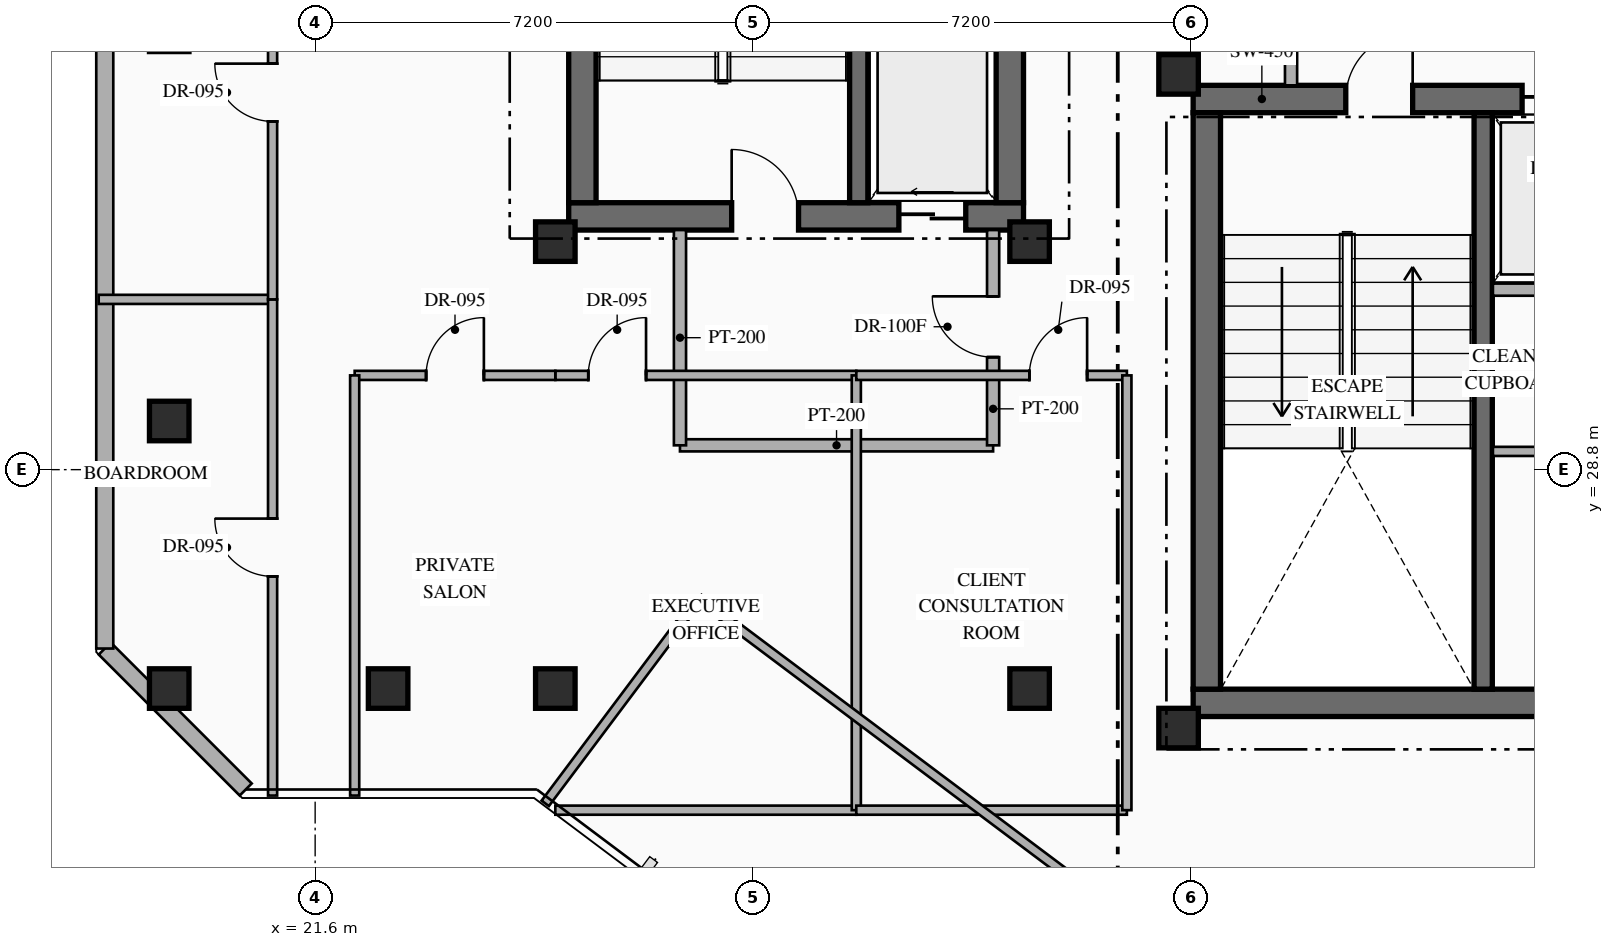
"""IFC4 building model, lengths in metres.
Left out: names, types, materials, properties, quantities, classifications, styles, units other than length and angle.
Written with IfcOpenShell. Run it as: python <this file> out.ifc"""

import sys

from ifc_helpers import new_model, si_unit, direction, frame, frame_2d, origin, origin_2d, place, context, subcontext, project, spatial, rectangle, hollow_rectangle, extrude, element, fill, save


model = new_model("IFC4")
c1 = context("Model", 3, precision=1e-05, world=origin(), true_north=direction((0.0, 1.0)))
c2 = subcontext(c1, "Body", "Model", "MODEL_VIEW")
j1 = project(units=[si_unit("LENGTHUNIT", "METRE"), si_unit("PLANEANGLEUNIT", "RADIAN")], contexts=[c1])
p1 = place(None, origin())
s1 = spatial("IfcSite", under=j1, at=p1, CompositionType="ELEMENT")
p2 = place(p1, origin())
s2 = spatial("IfcBuilding", under=s1, at=p2, CompositionType="ELEMENT")
p3 = place(p2, frame((0.0, 0.0, 253.95)))
s3 = spatial("IfcBuildingStorey", under=s2, at=p3, CompositionType="ELEMENT", Elevation=253.95)
p4 = place(p3, frame((25.77, 32.965, 0.0), z_axis=(0.0, 0.0, 1.0), x_axis=(1.0, 0.0, 0.0)))
e1 = element("IfcWall", 1, at=p4, inside=s3, PredefinedType="SHEAR", context=c2, shape_type="SweptSolid", body=[
    extrude(rectangle(XDim=7.48, YDim=0.45, at=frame_2d((3.74, 0.0))), origin(), (0.0, 0.0, 1.0), 3.6),
])
p5 = place(p4, frame((2.68, 0.0, 0.0)))
e2 = element("IfcOpeningElement", 2, at=p5, cuts=e1, PredefinedType="OPENING", context=c2, shape_type="SweptSolid", body=[
    extrude(rectangle(XDim=1.1, YDim=2.2, at=frame_2d((0.55, 1.1))), frame((0.0, 0.235, 0.0), z_axis=(0.0, -1.0, 0.0), x_axis=(1.0, 0.0, 0.0)), (0.0, 0.0, 1.0), 0.47),
])
p6 = place(p4, frame((5.43, 0.0, 0.0)))
e3 = element("IfcOpeningElement", 3, at=p6, cuts=e1, PredefinedType="OPENING", context=c2, shape_type="SweptSolid", body=[
    extrude(rectangle(XDim=1.1, YDim=2.15, at=frame_2d((0.55, 1.075))), frame((0.0, 0.235, 0.0), z_axis=(0.0, -1.0, 0.0), x_axis=(1.0, 0.0, 0.0)), (0.0, 0.0, 1.0), 0.47),
])
p7 = place(p3, frame((25.995, 33.19, 0.0), z_axis=(0.0, 0.0, 1.0), x_axis=(0.0, 1.0, 0.0)))
e4 = element("IfcWall", 4, at=p7, inside=s3, PredefinedType="SHEAR", context=c2, shape_type="SweptSolid", body=[
    extrude(rectangle(XDim=9.48, YDim=0.45, at=frame_2d((4.74, 0.0))), origin(), (0.0, 0.0, 1.0), 3.6),
])
p8 = place(p3, frame((33.025, 33.19, 0.0), z_axis=(0.0, 0.0, 1.0), x_axis=(0.0, 1.0, 0.0)))
e5 = element("IfcWall", 5, at=p8, inside=s3, PredefinedType="SHEAR", context=c2, shape_type="SweptSolid", body=[
    extrude(rectangle(XDim=9.48, YDim=0.45, at=frame_2d((4.74, 0.0))), origin(), (0.0, 0.0, 1.0), 3.6),
])
p9 = place(p8, frame((4.71, 0.0, 0.0)))
e6 = element("IfcOpeningElement", 6, at=p9, cuts=e5, PredefinedType="OPENING", context=c2, shape_type="SweptSolid", body=[
    extrude(rectangle(XDim=0.85, YDim=2.08, at=frame_2d((0.425, 1.04))), frame((0.0, 0.235, 0.0), z_axis=(0.0, -1.0, 0.0), x_axis=(1.0, 0.0, 0.0)), (0.0, 0.0, 1.0), 0.47),
])
p10 = place(p8, frame((7.76, 0.0, 0.0)))
e7 = element("IfcOpeningElement", 7, at=p10, cuts=e5, PredefinedType="OPENING", context=c2, shape_type="SweptSolid", body=[
    extrude(rectangle(XDim=0.85, YDim=2.08, at=frame_2d((0.425, 1.04))), frame((0.0, 0.235, 0.0), z_axis=(0.0, -1.0, 0.0), x_axis=(1.0, 0.0, 0.0)), (0.0, 0.0, 1.0), 0.47),
])
p11 = place(p3, frame((30.54, 33.19, 0.0), z_axis=(0.0, 0.0, 1.0), x_axis=(0.0, 1.0, 0.0)))
e8 = element("IfcWall", 8, at=p11, inside=s3, PredefinedType="SHEAR", context=c2, shape_type="SweptSolid", body=[
    extrude(rectangle(XDim=9.48, YDim=0.3, at=frame_2d((4.74, 0.0))), origin(), (0.0, 0.0, 1.0), 3.6),
])
p12 = place(p3, frame((36.04, 24.965, 0.0), z_axis=(0.0, 0.0, 1.0), x_axis=(1.0, 0.0, 0.0)))
e9 = element("IfcWall", 9, at=p12, inside=s3, PredefinedType="SHEAR", context=c2, shape_type="SweptSolid", body=[
    extrude(rectangle(XDim=7.46, YDim=0.45, at=frame_2d((3.73, 0.0))), origin(), (0.0, 0.0, 1.0), 3.6),
])
p13 = place(p3, frame((36.04, 34.895, 0.0), z_axis=(0.0, 0.0, 1.0), x_axis=(1.0, 0.0, 0.0)))
e10 = element("IfcWall", 10, at=p13, inside=s3, PredefinedType="SHEAR", context=c2, shape_type="SweptSolid", body=[
    extrude(rectangle(XDim=7.46, YDim=0.45, at=frame_2d((3.73, 0.0))), origin(), (0.0, 0.0, 1.0), 3.6),
])
p14 = place(p13, frame((2.51, 0.0, 0.0)))
e11 = element("IfcOpeningElement", 11, at=p14, cuts=e10, PredefinedType="OPENING", context=c2, shape_type="SweptSolid", body=[
    extrude(rectangle(XDim=1.1, YDim=2.2, at=frame_2d((0.55, 1.1))), frame((0.0, 0.235, 0.0), z_axis=(0.0, -1.0, 0.0), x_axis=(1.0, 0.0, 0.0)), (0.0, 0.0, 1.0), 0.47),
])
p15 = place(p13, frame((5.41, 0.0, 0.0)))
e12 = element("IfcOpeningElement", 12, at=p15, cuts=e10, PredefinedType="OPENING", context=c2, shape_type="SweptSolid", body=[
    extrude(rectangle(XDim=1.12, YDim=2.15, at=frame_2d((0.56, 1.075))), frame((0.0, 0.235, 0.0), z_axis=(0.0, -1.0, 0.0), x_axis=(1.0, 0.0, 0.0)), (0.0, 0.0, 1.0), 0.47),
])
p16 = place(p3, frame((36.265, 25.19, 0.0), z_axis=(0.0, 0.0, 1.0), x_axis=(0.0, 1.0, 0.0)))
e13 = element("IfcWall", 13, at=p16, inside=s3, PredefinedType="SHEAR", context=c2, shape_type="SweptSolid", body=[
    extrude(rectangle(XDim=9.48, YDim=0.45, at=frame_2d((4.74, 0.0))), origin(), (0.0, 0.0, 1.0), 3.6),
])
p17 = place(p3, frame((40.81, 25.19, 0.0), z_axis=(0.0, 0.0, 1.0), x_axis=(0.0, 1.0, 0.0)))
e14 = element("IfcWall", 14, at=p17, inside=s3, PredefinedType="SHEAR", context=c2, shape_type="SweptSolid", body=[
    extrude(rectangle(XDim=9.48, YDim=0.3, at=frame_2d((4.74, 0.0))), origin(), (0.0, 0.0, 1.0), 3.6),
])
for number, where, z_axis, x_axis in (
    (15, (25.55, 32.55, 0.0), (0.0, 0.0, 1.0), (1.0, 0.0, 0.0)),
    (16, (33.35, 32.55, 0.0), (0.0, 0.0, 1.0), (1.0, 0.0, 0.0)),
    (17, (35.8, 24.55, 0.0), (0.0, 0.0, 1.0), (1.0, 0.0, 0.0)),
    (18, (35.8, 35.3, 0.0), (0.0, 0.0, 1.0), (1.0, 0.0, 0.0)),
    (19, (25.55, 25.2, 0.0), (0.0, 0.0, 1.0), (1.0, 0.0, 0.0)),
    (20, (33.35, 25.2, 0.0), (0.0, 0.0, 1.0), (1.0, 0.0, 0.0)),
    (21, (19.2, 25.2, 0.0), (0.0, 0.0, 1.0), (1.0, 0.0, 0.0)),
    (22, (19.2, 29.6, 0.0), (0.0, 0.0, 1.0), (1.0, 0.0, 0.0)),
    (23, (22.8, 25.2, 0.0), (0.0, 0.0, 1.0), (1.0, 0.0, 0.0)),
):
    element("IfcColumn", number, at=place(p3, frame(where, z_axis=z_axis, x_axis=x_axis)), inside=s3, PredefinedType="COLUMN", context=c2, shape_type="SweptSolid", body=[
        extrude(hollow_rectangle(XDim=0.65, YDim=0.65, WallThickness=0.025, at=origin_2d()), origin(), (0.0, 0.0, 1.0), 3.6),
    ])
p18 = place(p3, frame((20.458, 23.54, 0.0), z_axis=(0.0, 0.0, 1.0), x_axis=(-0.707144017911, 0.707069542501, 0.0)))
e24 = element("IfcWall", 24, at=p18, inside=s3, PredefinedType="STANDARD", context=c2, shape_type="SweptSolid", body=[
    extrude(rectangle(XDim=3.278, YDim=0.28, at=frame_2d((1.639, 0.0))), origin(), (0.0, 0.0, 1.0), 3.35),
])
p19 = place(p3, frame((18.14, 25.858, 0.0), z_axis=(0.0, 0.0, 1.0), x_axis=(0.0, 1.0, 0.0)))
e25 = element("IfcWall", 25, at=p19, inside=s3, PredefinedType="STANDARD", context=c2, shape_type="SweptSolid", body=[
    extrude(rectangle(XDim=22.084, YDim=0.28, at=frame_2d((11.042, 0.0))), origin(), (0.0, 0.0, 1.0), 3.35),
])
p20 = place(p3, frame((40.97, 31.76, 0.0), z_axis=(0.0, 0.0, 1.0), x_axis=(1.0, 0.0, 0.0)))
e26 = element("IfcWall", 26, at=p20, inside=s3, PredefinedType="STANDARD", context=c2, shape_type="SweptSolid", body=[
    extrude(rectangle(XDim=2.08, YDim=0.2, at=frame_2d((1.04, 0.0))), origin(), (0.0, 0.0, 1.0), 3.35),
])
p21 = place(p3, frame((40.97, 29.1, 0.0), z_axis=(0.0, 0.0, 1.0), x_axis=(1.0, 0.0, 0.0)))
e27 = element("IfcWall", 27, at=p21, inside=s3, PredefinedType="PARTITIONING", context=c2, shape_type="SweptSolid", body=[
    extrude(rectangle(XDim=2.08, YDim=0.15, at=frame_2d((1.04, 0.0))), origin(), (0.0, 0.0, 1.0), 3.35),
])
p22 = place(p3, frame((27.6, 29.2, 0.0), z_axis=(0.0, 0.0, 1.0), x_axis=(1.0, 0.0, 0.0)))
e28 = element("IfcWall", 28, at=p22, inside=s3, PredefinedType="STANDARD", context=c2, shape_type="SweptSolid", body=[
    extrude(rectangle(XDim=5.15, YDim=0.2, at=frame_2d((2.575, 0.0))), origin(), (0.0, 0.0, 1.0), 3.35),
])
p23 = place(p3, frame((27.6, 29.2, 0.0), z_axis=(0.0, 0.0, 1.0), x_axis=(0.0, 1.0, 0.0)))
e29 = element("IfcWall", 29, at=p23, inside=s3, PredefinedType="STANDARD", context=c2, shape_type="SweptSolid", body=[
    extrude(rectangle(XDim=3.54, YDim=0.2, at=frame_2d((1.77, 0.0))), origin(), (0.0, 0.0, 1.0), 3.35),
])
p24 = place(p3, frame((32.75, 29.2, 0.0), z_axis=(0.0, 0.0, 1.0), x_axis=(0.0, 1.0, 0.0)))
e30 = element("IfcWall", 30, at=p24, inside=s3, PredefinedType="STANDARD", context=c2, shape_type="SweptSolid", body=[
    extrude(rectangle(XDim=3.54, YDim=0.2, at=frame_2d((1.77, 0.0))), origin(), (0.0, 0.0, 1.0), 3.35),
])
p25 = place(p24, frame((1.45, 0.0, 0.0)))
e31 = element("IfcOpeningElement", 31, at=p25, cuts=e30, PredefinedType="OPENING", context=c2, shape_type="SweptSolid", body=[
    extrude(rectangle(XDim=1.0, YDim=2.2, at=frame_2d((0.5, 1.1))), frame((0.0, 0.11, 0.0), z_axis=(0.0, -1.0, 0.0), x_axis=(1.0, 0.0, 0.0)), (0.0, 0.0, 1.0), 0.22),
])
p26 = place(p3, frame((37.65, 35.12, 0.0), z_axis=(0.0, 0.0, 1.0), x_axis=(0.0, 1.0, 0.0)))
e32 = element("IfcWall", 32, at=p26, inside=s3, PredefinedType="STANDARD", context=c2, shape_type="SweptSolid", body=[
    extrude(rectangle(XDim=2.98, YDim=0.2, at=frame_2d((1.49, 0.0))), origin(), (0.0, 0.0, 1.0), 3.35),
])
p27 = place(p26, frame((0.99, 0.0, 0.0)))
e33 = element("IfcOpeningElement", 33, at=p27, cuts=e32, PredefinedType="OPENING", context=c2, shape_type="SweptSolid", body=[
    extrude(rectangle(XDim=1.0, YDim=2.2, at=frame_2d((0.5, 1.1))), frame((0.0, 0.11, 0.0), z_axis=(0.0, -1.0, 0.0), x_axis=(1.0, 0.0, 0.0)), (0.0, 0.0, 1.0), 0.22),
])
p28 = place(p3, frame((25.55, 23.2, 0.0), z_axis=(0.0, 0.0, 1.0), x_axis=(1.0, 0.0, 0.0)))
e34 = element("IfcWall", 34, at=p28, inside=s3, PredefinedType="PARTITIONING", context=c2, shape_type="SweptSolid", body=[
    extrude(rectangle(XDim=4.95, YDim=0.15, at=frame_2d((2.475, 0.0))), origin(), (0.0, 0.0, 1.0), 3.35),
])
p29 = place(p3, frame((25.55, 30.35, 0.0), z_axis=(0.0, 0.0, 1.0), x_axis=(1.0, 0.0, 0.0)))
e35 = element("IfcWall", 35, at=p29, inside=s3, PredefinedType="PARTITIONING", context=c2, shape_type="SweptSolid", body=[
    extrude(rectangle(XDim=4.95, YDim=0.15, at=frame_2d((2.475, 0.0))), origin(), (0.0, 0.0, 1.0), 3.35),
])
p30 = place(p29, frame((0.542, 0.0, 0.0)))
e36 = element("IfcOpeningElement", 36, at=p30, cuts=e35, PredefinedType="OPENING", context=c2, shape_type="SweptSolid", body=[
    extrude(rectangle(XDim=0.95, YDim=2.15, at=frame_2d((0.475, 1.075))), frame((0.0, 0.085, 0.0), z_axis=(0.0, -1.0, 0.0), x_axis=(1.0, 0.0, 0.0)), (0.0, 0.0, 1.0), 0.17),
])
p31 = place(p3, frame((30.5, 23.2, 0.0), z_axis=(0.0, 0.0, 1.0), x_axis=(0.0, 1.0, 0.0)))
e37 = element("IfcWall", 37, at=p31, inside=s3, PredefinedType="PARTITIONING", context=c2, shape_type="SweptSolid", body=[
    extrude(rectangle(XDim=7.15, YDim=0.15, at=frame_2d((3.575, 0.0))), origin(), (0.0, 0.0, 1.0), 3.35),
])
p32 = place(p3, frame((30.5, 23.2, 0.0), z_axis=(0.0, 0.0, 1.0), x_axis=(1.0, 0.0, 0.0)))
e38 = element("IfcWall", 38, at=p32, inside=s3, PredefinedType="PARTITIONING", context=c2, shape_type="SweptSolid", body=[
    extrude(rectangle(XDim=4.45, YDim=0.15, at=frame_2d((2.225, 0.0))), origin(), (0.0, 0.0, 1.0), 3.35),
])
p33 = place(p3, frame((30.5, 30.35, 0.0), z_axis=(0.0, 0.0, 1.0), x_axis=(1.0, 0.0, 0.0)))
e39 = element("IfcWall", 39, at=p33, inside=s3, PredefinedType="PARTITIONING", context=c2, shape_type="SweptSolid", body=[
    extrude(rectangle(XDim=4.45, YDim=0.15, at=frame_2d((2.225, 0.0))), origin(), (0.0, 0.0, 1.0), 3.35),
])
p34 = place(p33, frame((2.846, 0.0, 0.0)))
e40 = element("IfcOpeningElement", 40, at=p34, cuts=e39, PredefinedType="OPENING", context=c2, shape_type="SweptSolid", body=[
    extrude(rectangle(XDim=0.95, YDim=2.15, at=frame_2d((0.475, 1.075))), frame((0.0, 0.085, 0.0), z_axis=(0.0, -1.0, 0.0), x_axis=(1.0, 0.0, 0.0)), (0.0, 0.0, 1.0), 0.17),
])
p35 = place(p3, frame((34.95, 23.2, 0.0), z_axis=(0.0, 0.0, 1.0), x_axis=(0.0, 1.0, 0.0)))
e41 = element("IfcWall", 41, at=p35, inside=s3, PredefinedType="PARTITIONING", context=c2, shape_type="SweptSolid", body=[
    extrude(rectangle(XDim=7.15, YDim=0.15, at=frame_2d((3.575, 0.0))), origin(), (0.0, 0.0, 1.0), 3.35),
])
p36 = place(p3, frame((18.04, 31.6, 0.0), z_axis=(0.0, 0.0, 1.0), x_axis=(1.0, 0.0, 0.0)))
e42 = element("IfcWall", 42, at=p36, inside=s3, PredefinedType="PARTITIONING", context=c2, shape_type="SweptSolid", body=[
    extrude(rectangle(XDim=2.86, YDim=0.15, at=frame_2d((1.43, 0.0))), origin(), (0.0, 0.0, 1.0), 3.35),
])
p37 = place(p3, frame((20.9, 23.44, 0.0), z_axis=(0.0, 0.0, 1.0), x_axis=(0.0, 1.0, 0.0)))
e43 = element("IfcWall", 43, at=p37, inside=s3, PredefinedType="PARTITIONING", context=c2, shape_type="SweptSolid", body=[
    extrude(rectangle(XDim=8.16, YDim=0.15, at=frame_2d((4.08, 0.0))), origin(), (0.0, 0.0, 1.0), 3.35),
])
p38 = place(p37, frame((3.605, 0.0, 0.0)))
e44 = element("IfcOpeningElement", 44, at=p38, cuts=e43, PredefinedType="OPENING", context=c2, shape_type="SweptSolid", body=[
    extrude(rectangle(XDim=0.95, YDim=2.15, at=frame_2d((0.475, 1.075))), frame((0.0, 0.085, 0.0), z_axis=(0.0, -1.0, 0.0), x_axis=(1.0, 0.0, 0.0)), (0.0, 0.0, 1.0), 0.17),
])
p39 = place(p3, frame((20.9, 31.6, 0.0), z_axis=(0.0, 0.0, 1.0), x_axis=(0.0, 1.0, 0.0)))
e45 = element("IfcWall", 45, at=p39, inside=s3, PredefinedType="PARTITIONING", context=c2, shape_type="SweptSolid", body=[
    extrude(rectangle(XDim=10.2, YDim=0.15, at=frame_2d((5.1, 0.0))), origin(), (0.0, 0.0, 1.0), 3.35),
])
p40 = place(p39, frame((2.927, 0.0, 0.0)))
e46 = element("IfcOpeningElement", 46, at=p40, cuts=e45, PredefinedType="OPENING", context=c2, shape_type="SweptSolid", body=[
    extrude(rectangle(XDim=0.95, YDim=2.15, at=frame_2d((0.475, 1.075))), frame((0.0, 0.085, 0.0), z_axis=(0.0, -1.0, 0.0), x_axis=(1.0, 0.0, 0.0)), (0.0, 0.0, 1.0), 0.17),
])
p41 = place(p3, frame((22.25, 30.35, 0.0), z_axis=(0.0, 0.0, 1.0), x_axis=(1.0, 0.0, 0.0)))
e47 = element("IfcWall", 47, at=p41, inside=s3, PredefinedType="PARTITIONING", context=c2, shape_type="SweptSolid", body=[
    extrude(rectangle(XDim=3.3, YDim=0.15, at=frame_2d((1.65, 0.0))), origin(), (0.0, 0.0, 1.0), 3.35),
])
p42 = place(p41, frame((1.175, 0.0, 0.0)))
e48 = element("IfcOpeningElement", 48, at=p42, cuts=e47, PredefinedType="OPENING", context=c2, shape_type="SweptSolid", body=[
    extrude(rectangle(XDim=0.95, YDim=2.15, at=frame_2d((0.475, 1.075))), frame((0.0, 0.085, 0.0), z_axis=(0.0, -1.0, 0.0), x_axis=(1.0, 0.0, 0.0)), (0.0, 0.0, 1.0), 0.17),
])
p43 = place(p3, frame((22.25, 23.44, 0.0), z_axis=(0.0, 0.0, 1.0), x_axis=(0.0, 1.0, 0.0)))
e49 = element("IfcWall", 49, at=p43, inside=s3, PredefinedType="PARTITIONING", context=c2, shape_type="SweptSolid", body=[
    extrude(rectangle(XDim=6.91, YDim=0.15, at=frame_2d((3.455, 0.0))), origin(), (0.0, 0.0, 1.0), 3.35),
])
p44 = place(p3, frame((27.91, 26.68, 0.0), z_axis=(0.0, 0.0, 1.0), x_axis=(0.8, -0.6, 0.0)))
e50 = element("IfcWall", 50, at=p44, inside=s3, PredefinedType="PARTITIONING", context=c2, shape_type="SweptSolid", body=[
    extrude(rectangle(XDim=17.76, YDim=0.15, at=frame_2d((8.88, 0.0))), origin(), (0.0, 0.0, 1.0), 3.35),
])
p45 = place(p44, frame((11.294, 0.0, 0.0)))
e51 = element("IfcOpeningElement", 51, at=p45, cuts=e50, PredefinedType="OPENING", context=c2, shape_type="SweptSolid", body=[
    extrude(rectangle(XDim=0.95, YDim=2.15, at=frame_2d((0.475, 1.075))), frame((0.0, 0.085, 0.0), z_axis=(0.0, -1.0, 0.0), x_axis=(1.0, 0.0, 0.0)), (0.0, 0.0, 1.0), 0.17),
])
p46 = place(p3, frame((25.384, 23.312, 0.0), z_axis=(0.0, 0.0, 1.0), x_axis=(0.599990721155, 0.80000695905, 0.0)))
e52 = element("IfcWall", 52, at=p46, inside=s3, PredefinedType="PARTITIONING", context=c2, shape_type="SweptSolid", body=[
    extrude(rectangle(XDim=4.21, YDim=0.15, at=frame_2d((2.105, 0.0))), origin(), (0.0, 0.0, 1.0), 3.35),
])
p47 = place(p5, origin())
e53 = element("IfcDoor", 53, at=p47, inside=s3, OperationType="SINGLE_SWING_LEFT", PredefinedType="DOOR", context=c2, shape_type="SweptSolid", body=[
    extrude(rectangle(XDim=1.1, YDim=2.2, at=frame_2d((0.55, 1.1))), frame((0.0, 0.025, 0.0), z_axis=(0.0, -1.0, 0.0), x_axis=(1.0, 0.0, 0.0)), (0.0, 0.0, 1.0), 0.05),
])
fill(e2, e53)
p48 = place(p6, origin())
e54 = element("IfcDoor", 54, at=p48, inside=s3, OperationType="SLIDING_TO_LEFT", PredefinedType="USERDEFINED", context=c2, shape_type="SweptSolid", body=[
    extrude(rectangle(XDim=1.1, YDim=2.15, at=frame_2d((0.55, 1.075))), frame((0.0, 0.025, 0.0), z_axis=(0.0, -1.0, 0.0), x_axis=(1.0, 0.0, 0.0)), (0.0, 0.0, 1.0), 0.05),
])
fill(e3, e54)
p49 = place(p14, origin())
e55 = element("IfcDoor", 55, at=p49, inside=s3, OperationType="SINGLE_SWING_RIGHT", PredefinedType="DOOR", context=c2, shape_type="SweptSolid", body=[
    extrude(rectangle(XDim=1.1, YDim=2.2, at=frame_2d((0.55, 1.1))), frame((0.0, 0.025, 0.0), z_axis=(0.0, -1.0, 0.0), x_axis=(1.0, 0.0, 0.0)), (0.0, 0.0, 1.0), 0.05),
])
fill(e11, e55)
p50 = place(p15, origin())
e56 = element("IfcDoor", 56, at=p50, inside=s3, OperationType="SLIDING_TO_RIGHT", PredefinedType="USERDEFINED", context=c2, shape_type="SweptSolid", body=[
    extrude(rectangle(XDim=1.12, YDim=2.15, at=frame_2d((0.56, 1.075))), frame((0.0, 0.025, 0.0), z_axis=(0.0, -1.0, 0.0), x_axis=(1.0, 0.0, 0.0)), (0.0, 0.0, 1.0), 0.05),
])
fill(e12, e56)
p51 = place(p25, origin())
e57 = element("IfcDoor", 57, at=p51, inside=s3, OperationType="SINGLE_SWING_RIGHT", PredefinedType="DOOR", context=c2, shape_type="SweptSolid", body=[
    extrude(rectangle(XDim=1.0, YDim=2.2, at=frame_2d((0.5, 1.1))), frame((0.0, 0.025, 0.0), z_axis=(0.0, -1.0, 0.0), x_axis=(1.0, 0.0, 0.0)), (0.0, 0.0, 1.0), 0.05),
])
fill(e31, e57)
p52 = place(p30, origin())
e58 = element("IfcDoor", 58, at=p52, inside=s3, OperationType="SINGLE_SWING_RIGHT", PredefinedType="DOOR", context=c2, shape_type="SweptSolid", body=[
    extrude(rectangle(XDim=0.95, YDim=2.15, at=frame_2d((0.475, 1.075))), frame((0.0, 0.025, 0.0), z_axis=(0.0, -1.0, 0.0), x_axis=(1.0, 0.0, 0.0)), (0.0, 0.0, 1.0), 0.05),
])
fill(e36, e58)
p53 = place(p34, origin())
e59 = element("IfcDoor", 59, at=p53, inside=s3, OperationType="SINGLE_SWING_RIGHT", PredefinedType="DOOR", context=c2, shape_type="SweptSolid", body=[
    extrude(rectangle(XDim=0.95, YDim=2.15, at=frame_2d((0.475, 1.075))), frame((0.0, 0.025, 0.0), z_axis=(0.0, -1.0, 0.0), x_axis=(1.0, 0.0, 0.0)), (0.0, 0.0, 1.0), 0.05),
])
fill(e40, e59)
p54 = place(p38, origin())
e60 = element("IfcDoor", 60, at=p54, inside=s3, OperationType="SINGLE_SWING_RIGHT", PredefinedType="DOOR", context=c2, shape_type="SweptSolid", body=[
    extrude(rectangle(XDim=0.95, YDim=2.15, at=frame_2d((0.475, 1.075))), frame((0.0, 0.025, 0.0), z_axis=(0.0, -1.0, 0.0), x_axis=(1.0, 0.0, 0.0)), (0.0, 0.0, 1.0), 0.05),
])
fill(e44, e60)
p55 = place(p40, origin())
e61 = element("IfcDoor", 61, at=p55, inside=s3, OperationType="SINGLE_SWING_RIGHT", PredefinedType="DOOR", context=c2, shape_type="SweptSolid", body=[
    extrude(rectangle(XDim=0.95, YDim=2.15, at=frame_2d((0.475, 1.075))), frame((0.0, 0.025, 0.0), z_axis=(0.0, -1.0, 0.0), x_axis=(1.0, 0.0, 0.0)), (0.0, 0.0, 1.0), 0.05),
])
fill(e46, e61)
p56 = place(p42, origin())
e62 = element("IfcDoor", 62, at=p56, inside=s3, OperationType="SINGLE_SWING_RIGHT", PredefinedType="DOOR", context=c2, shape_type="SweptSolid", body=[
    extrude(rectangle(XDim=0.95, YDim=2.15, at=frame_2d((0.475, 1.075))), frame((0.0, 0.025, 0.0), z_axis=(0.0, -1.0, 0.0), x_axis=(1.0, 0.0, 0.0)), (0.0, 0.0, 1.0), 0.05),
])
fill(e48, e62)
save(model, sys.argv[1])
